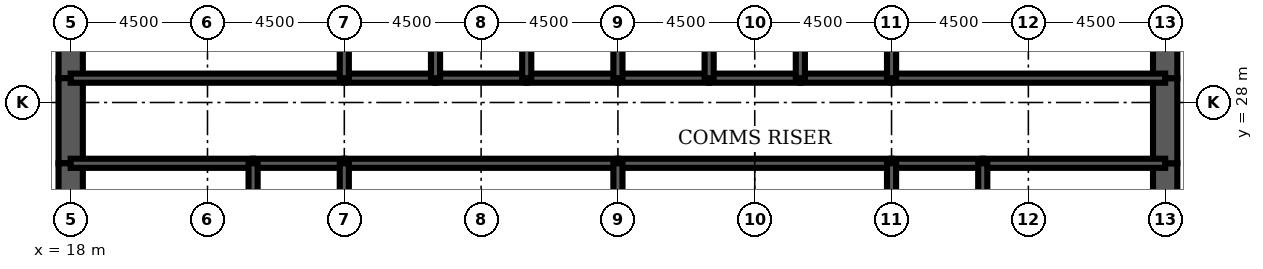
"""IFC4 building model, lengths in metres.
Left out: names, types, materials, properties, quantities, classifications, styles, units other than length and angle.
Written with IfcOpenShell. Run it as: python <this file> out.ifc"""

import sys

from ifc_helpers import new_model, si_unit, direction, frame, frame_2d, origin, place, context, subcontext, project, spatial, rectangle, extrude, element, fill, save


model = new_model("IFC4")
c1 = context("Model", 3, precision=1e-05, world=origin(), true_north=direction((0.0, 1.0)))
c2 = subcontext(c1, "Body", "Model", "MODEL_VIEW")
j1 = project(units=[si_unit("LENGTHUNIT", "METRE"), si_unit("PLANEANGLEUNIT", "RADIAN")], contexts=[c1])
p1 = place(None, origin())
s1 = spatial("IfcSite", under=j1, at=p1, CompositionType="ELEMENT")
p2 = place(p1, origin())
s2 = spatial("IfcBuilding", under=s1, at=p2, CompositionType="ELEMENT")
p3 = place(p2, frame((0.0, 0.0, 253.0)))
s3 = spatial("IfcBuildingStorey", under=s2, at=p3, CompositionType="ELEMENT", Elevation=253.0)
p4 = place(p3, frame((18.0, 32.0, 0.0), z_axis=(0.0, 0.0, 1.0), x_axis=(0.0, -1.0, 0.0)))
e1 = element("IfcWall", 1, at=p4, inside=s3, PredefinedType="SHEAR", context=c2, shape_type="SweptSolid", body=[
    extrude(rectangle(XDim=3.2, YDim=0.8, at=frame_2d((1.6, 0.0))), origin(), (0.0, 0.0, 1.0), 4.2),
])
p5 = place(p3, frame((18.0, 28.8, 0.0), z_axis=(0.0, 0.0, 1.0), x_axis=(0.0, -1.0, 0.0)))
e2 = element("IfcWall", 2, at=p5, inside=s3, PredefinedType="SHEAR", context=c2, shape_type="SweptSolid", body=[
    extrude(rectangle(XDim=2.8, YDim=0.8, at=frame_2d((1.4, 0.0))), origin(), (0.0, 0.0, 1.0), 4.2),
])
p6 = place(p5, frame((0.4, 0.0, 0.0)))
e3 = element("IfcOpeningElement", 3, at=p6, cuts=e2, PredefinedType="OPENING", context=c2, shape_type="SweptSolid", body=[
    extrude(rectangle(XDim=1.8, YDim=2.1, at=frame_2d((0.9, 1.05))), frame((0.0, 0.41, 0.0), z_axis=(0.0, -1.0, 0.0), x_axis=(1.0, 0.0, 0.0)), (0.0, 0.0, 1.0), 0.82),
])
for number, where, z_axis, x_axis in (
    (4, (18.0, 26.0, 0.0), (0.0, 0.0, 1.0), (0.0, -1.0, 0.0)),
    (5, (54.0, 22.0, 0.0), (0.0, 0.0, 1.0), (0.0, 1.0, 0.0)),
):
    element("IfcWall", number, at=place(p3, frame(where, z_axis=z_axis, x_axis=x_axis)), inside=s3, PredefinedType="SHEAR", context=c2, shape_type="SweptSolid", body=[
        extrude(rectangle(XDim=4.0, YDim=0.8, at=frame_2d((2.0, 0.0))), origin(), (0.0, 0.0, 1.0), 4.2),
    ])
p7 = place(p3, frame((54.0, 26.0, 0.0), z_axis=(0.0, 0.0, 1.0), x_axis=(0.0, 1.0, 0.0)))
e6 = element("IfcWall", 6, at=p7, inside=s3, PredefinedType="SHEAR", context=c2, shape_type="SweptSolid", body=[
    extrude(rectangle(XDim=2.8, YDim=0.8, at=frame_2d((1.4, 0.0))), origin(), (0.0, 0.0, 1.0), 4.2),
])
p8 = place(p7, frame((0.6, 0.0, 0.0)))
e7 = element("IfcOpeningElement", 7, at=p8, cuts=e6, PredefinedType="OPENING", context=c2, shape_type="SweptSolid", body=[
    extrude(rectangle(XDim=1.8, YDim=2.1, at=frame_2d((0.9, 1.05))), frame((0.0, 0.41, 0.0), z_axis=(0.0, -1.0, 0.0), x_axis=(1.0, 0.0, 0.0)), (0.0, 0.0, 1.0), 0.82),
])
p9 = place(p3, frame((54.0, 28.8, 0.0), z_axis=(0.0, 0.0, 1.0), x_axis=(0.0, 1.0, 0.0)))
e8 = element("IfcWall", 8, at=p9, inside=s3, PredefinedType="SHEAR", context=c2, shape_type="SweptSolid", body=[
    extrude(rectangle(XDim=3.2, YDim=0.8, at=frame_2d((1.6, 0.0))), origin(), (0.0, 0.0, 1.0), 4.2),
])
p10 = place(p3, frame((18.0, 28.8, 0.0), z_axis=(0.0, 0.0, 1.0), x_axis=(1.0, 0.0, 0.0)))
e9 = element("IfcWall", 9, at=p10, inside=s3, PredefinedType="SOLIDWALL", context=c2, shape_type="SweptSolid", body=[
    extrude(rectangle(XDim=9.0, YDim=0.3, at=frame_2d((4.5, 0.0))), origin(), (0.0, 0.0, 1.0), 4.2),
])
p11 = place(p10, frame((0.65, 0.0, 0.0)))
e10 = element("IfcOpeningElement", 10, at=p11, cuts=e9, PredefinedType="OPENING", context=c2, shape_type="SweptSolid", body=[
    extrude(rectangle(XDim=1.0, YDim=2.1, at=frame_2d((0.5, 1.05))), frame((0.0, 0.16, 0.0), z_axis=(0.0, -1.0, 0.0), x_axis=(1.0, 0.0, 0.0)), (0.0, 0.0, 1.0), 0.32),
])
p12 = place(p3, frame((27.0, 28.8, 0.0), z_axis=(0.0, 0.0, 1.0), x_axis=(1.0, 0.0, 0.0)))
e11 = element("IfcWall", 11, at=p12, inside=s3, PredefinedType="SOLIDWALL", context=c2, shape_type="SweptSolid", body=[
    extrude(rectangle(XDim=3.0, YDim=0.3, at=frame_2d((1.5, 0.0))), origin(), (0.0, 0.0, 1.0), 4.2),
])
p13 = place(p12, frame((0.95, 0.0, 0.0)))
e12 = element("IfcOpeningElement", 12, at=p13, cuts=e11, PredefinedType="OPENING", context=c2, shape_type="SweptSolid", body=[
    extrude(rectangle(XDim=1.1, YDim=2.2, at=frame_2d((0.55, 1.1))), frame((0.0, 0.16, 0.0), z_axis=(0.0, -1.0, 0.0), x_axis=(1.0, 0.0, 0.0)), (0.0, 0.0, 1.0), 0.32),
])
p14 = place(p3, frame((30.0, 28.8, 0.0), z_axis=(0.0, 0.0, 1.0), x_axis=(1.0, 0.0, 0.0)))
e13 = element("IfcWall", 13, at=p14, inside=s3, PredefinedType="SOLIDWALL", context=c2, shape_type="SweptSolid", body=[
    extrude(rectangle(XDim=3.0, YDim=0.3, at=frame_2d((1.5, 0.0))), origin(), (0.0, 0.0, 1.0), 4.2),
])
p15 = place(p14, frame((0.95, 0.0, 0.0)))
e14 = element("IfcOpeningElement", 14, at=p15, cuts=e13, PredefinedType="OPENING", context=c2, shape_type="SweptSolid", body=[
    extrude(rectangle(XDim=1.1, YDim=2.2, at=frame_2d((0.55, 1.1))), frame((0.0, 0.16, 0.0), z_axis=(0.0, -1.0, 0.0), x_axis=(1.0, 0.0, 0.0)), (0.0, 0.0, 1.0), 0.32),
])
p16 = place(p3, frame((33.0, 28.8, 0.0), z_axis=(0.0, 0.0, 1.0), x_axis=(1.0, 0.0, 0.0)))
e15 = element("IfcWall", 15, at=p16, inside=s3, PredefinedType="SOLIDWALL", context=c2, shape_type="SweptSolid", body=[
    extrude(rectangle(XDim=3.0, YDim=0.3, at=frame_2d((1.5, 0.0))), origin(), (0.0, 0.0, 1.0), 4.2),
])
p17 = place(p16, frame((0.95, 0.0, 0.0)))
e16 = element("IfcOpeningElement", 16, at=p17, cuts=e15, PredefinedType="OPENING", context=c2, shape_type="SweptSolid", body=[
    extrude(rectangle(XDim=1.1, YDim=2.2, at=frame_2d((0.55, 1.1))), frame((0.0, 0.16, 0.0), z_axis=(0.0, -1.0, 0.0), x_axis=(1.0, 0.0, 0.0)), (0.0, 0.0, 1.0), 0.32),
])
for number, where, z_axis, x_axis in (
    (17, (36.0, 28.8, 0.0), (0.0, 0.0, 1.0), (1.0, 0.0, 0.0)),
    (18, (39.0, 28.8, 0.0), (0.0, 0.0, 1.0), (1.0, 0.0, 0.0)),
):
    element("IfcWall", number, at=place(p3, frame(where, z_axis=z_axis, x_axis=x_axis)), inside=s3, PredefinedType="SOLIDWALL", context=c2, shape_type="SweptSolid", body=[
        extrude(rectangle(XDim=3.0, YDim=0.3, at=frame_2d((1.5, 0.0))), origin(), (0.0, 0.0, 1.0), 4.2),
    ])
p18 = place(p3, frame((42.0, 28.8, 0.0), z_axis=(0.0, 0.0, 1.0), x_axis=(1.0, 0.0, 0.0)))
e19 = element("IfcWall", 19, at=p18, inside=s3, PredefinedType="SOLIDWALL", context=c2, shape_type="SweptSolid", body=[
    extrude(rectangle(XDim=3.0, YDim=0.3, at=frame_2d((1.5, 0.0))), origin(), (0.0, 0.0, 1.0), 4.2),
])
p19 = place(p18, frame((0.95, 0.0, 0.0)))
e20 = element("IfcOpeningElement", 20, at=p19, cuts=e19, PredefinedType="OPENING", context=c2, shape_type="SweptSolid", body=[
    extrude(rectangle(XDim=1.1, YDim=2.2, at=frame_2d((0.55, 1.1))), frame((0.0, 0.16, 0.0), z_axis=(0.0, -1.0, 0.0), x_axis=(1.0, 0.0, 0.0)), (0.0, 0.0, 1.0), 0.32),
])
p20 = place(p3, frame((45.0, 28.8, 0.0), z_axis=(0.0, 0.0, 1.0), x_axis=(1.0, 0.0, 0.0)))
e21 = element("IfcWall", 21, at=p20, inside=s3, PredefinedType="SOLIDWALL", context=c2, shape_type="SweptSolid", body=[
    extrude(rectangle(XDim=9.0, YDim=0.3, at=frame_2d((4.5, 0.0))), origin(), (0.0, 0.0, 1.0), 4.2),
])
p21 = place(p20, frame((7.35, 0.0, 0.0)))
e22 = element("IfcOpeningElement", 22, at=p21, cuts=e21, PredefinedType="OPENING", context=c2, shape_type="SweptSolid", body=[
    extrude(rectangle(XDim=1.0, YDim=2.1, at=frame_2d((0.5, 1.05))), frame((0.0, 0.16, 0.0), z_axis=(0.0, -1.0, 0.0), x_axis=(1.0, 0.0, 0.0)), (0.0, 0.0, 1.0), 0.32),
])
p22 = place(p3, frame((18.0, 26.0, 0.0), z_axis=(0.0, 0.0, 1.0), x_axis=(1.0, 0.0, 0.0)))
e23 = element("IfcWall", 23, at=p22, inside=s3, PredefinedType="SOLIDWALL", context=c2, shape_type="SweptSolid", body=[
    extrude(rectangle(XDim=6.0, YDim=0.3, at=frame_2d((3.0, 0.0))), origin(), (0.0, 0.0, 1.0), 4.2),
])
p23 = place(p3, frame((24.0, 26.0, 0.0), z_axis=(0.0, 0.0, 1.0), x_axis=(1.0, 0.0, 0.0)))
e24 = element("IfcWall", 24, at=p23, inside=s3, PredefinedType="SOLIDWALL", context=c2, shape_type="SweptSolid", body=[
    extrude(rectangle(XDim=3.0, YDim=0.3, at=frame_2d((1.5, 0.0))), origin(), (0.0, 0.0, 1.0), 4.2),
])
for number, where, z_axis, x_axis in (
    (25, (27.0, 26.0, 0.0), (0.0, 0.0, 1.0), (1.0, 0.0, 0.0)),
    (26, (36.0, 26.0, 0.0), (0.0, 0.0, 1.0), (1.0, 0.0, 0.0)),
):
    element("IfcWall", number, at=place(p3, frame(where, z_axis=z_axis, x_axis=x_axis)), inside=s3, PredefinedType="SOLIDWALL", context=c2, shape_type="SweptSolid", body=[
        extrude(rectangle(XDim=9.0, YDim=0.3, at=frame_2d((4.5, 0.0))), origin(), (0.0, 0.0, 1.0), 4.2),
    ])
p24 = place(p3, frame((45.0, 26.0, 0.0), z_axis=(0.0, 0.0, 1.0), x_axis=(1.0, 0.0, 0.0)))
e27 = element("IfcWall", 27, at=p24, inside=s3, PredefinedType="SOLIDWALL", context=c2, shape_type="SweptSolid", body=[
    extrude(rectangle(XDim=3.0, YDim=0.3, at=frame_2d((1.5, 0.0))), origin(), (0.0, 0.0, 1.0), 4.2),
])
p25 = place(p3, frame((48.0, 26.0, 0.0), z_axis=(0.0, 0.0, 1.0), x_axis=(1.0, 0.0, 0.0)))
e28 = element("IfcWall", 28, at=p25, inside=s3, PredefinedType="SOLIDWALL", context=c2, shape_type="SweptSolid", body=[
    extrude(rectangle(XDim=6.0, YDim=0.3, at=frame_2d((3.0, 0.0))), origin(), (0.0, 0.0, 1.0), 4.2),
])
for number, where, z_axis, x_axis in (
    (29, (27.0, 28.8, 0.0), (0.0, 0.0, 1.0), (0.0, 1.0, 0.0)),
    (30, (30.0, 28.8, 0.0), (0.0, 0.0, 1.0), (0.0, 1.0, 0.0)),
    (31, (33.0, 28.8, 0.0), (0.0, 0.0, 1.0), (0.0, 1.0, 0.0)),
    (32, (36.0, 28.8, 0.0), (0.0, 0.0, 1.0), (0.0, 1.0, 0.0)),
    (33, (39.0, 28.8, 0.0), (0.0, 0.0, 1.0), (0.0, 1.0, 0.0)),
    (34, (42.0, 28.8, 0.0), (0.0, 0.0, 1.0), (0.0, 1.0, 0.0)),
    (35, (45.0, 28.8, 0.0), (0.0, 0.0, 1.0), (0.0, 1.0, 0.0)),
):
    element("IfcWall", number, at=place(p3, frame(where, z_axis=z_axis, x_axis=x_axis)), inside=s3, PredefinedType="SOLIDWALL", context=c2, shape_type="SweptSolid", body=[
        extrude(rectangle(XDim=3.2, YDim=0.3, at=frame_2d((1.6, 0.0))), origin(), (0.0, 0.0, 1.0), 4.2),
    ])
for number, where, z_axis, x_axis in (
    (36, (24.0, 22.0, 0.0), (0.0, 0.0, 1.0), (0.0, 1.0, 0.0)),
    (37, (27.0, 22.0, 0.0), (0.0, 0.0, 1.0), (0.0, 1.0, 0.0)),
    (38, (36.0, 22.0, 0.0), (0.0, 0.0, 1.0), (0.0, 1.0, 0.0)),
    (39, (45.0, 22.0, 0.0), (0.0, 0.0, 1.0), (0.0, 1.0, 0.0)),
    (40, (48.0, 22.0, 0.0), (0.0, 0.0, 1.0), (0.0, 1.0, 0.0)),
):
    element("IfcWall", number, at=place(p3, frame(where, z_axis=z_axis, x_axis=x_axis)), inside=s3, PredefinedType="SOLIDWALL", context=c2, shape_type="SweptSolid", body=[
        extrude(rectangle(XDim=4.0, YDim=0.3, at=frame_2d((2.0, 0.0))), origin(), (0.0, 0.0, 1.0), 4.2),
    ])
p26 = place(p3, frame((42.5, 22.15, 0.0), z_axis=(0.0, 0.0, 1.0), x_axis=(0.0, 1.0, 0.0)))
e41 = element("IfcWall", 41, at=p26, inside=s3, PredefinedType="PARTITIONING", context=c2, shape_type="SweptSolid", body=[
    extrude(rectangle(XDim=3.7, YDim=0.15, at=frame_2d((1.85, 0.0))), origin(), (0.0, 0.0, 1.0), 3.0),
])
p27 = place(p26, frame((2.2, 0.0, 0.0)))
e42 = element("IfcOpeningElement", 42, at=p27, cuts=e41, PredefinedType="OPENING", context=c2, shape_type="SweptSolid", body=[
    extrude(rectangle(XDim=1.0, YDim=2.1, at=frame_2d((0.5, 1.05))), frame((0.0, 0.085, 0.0), z_axis=(0.0, -1.0, 0.0), x_axis=(1.0, 0.0, 0.0)), (0.0, 0.0, 1.0), 0.17),
])
p28 = place(p3, frame((51.725, 22.15, 0.0), z_axis=(0.0, 0.0, 1.0), x_axis=(0.0, 1.0, 0.0)))
e43 = element("IfcWall", 43, at=p28, inside=s3, PredefinedType="PARTITIONING", context=c2, shape_type="SweptSolid", body=[
    extrude(rectangle(XDim=3.7, YDim=0.15, at=frame_2d((1.85, 0.0))), origin(), (0.0, 0.0, 1.0), 3.0),
])
p29 = place(p3, frame((49.2, 26.15, 0.0), z_axis=(0.0, 0.0, 1.0), x_axis=(0.0, 1.0, 0.0)))
e44 = element("IfcWall", 44, at=p29, inside=s3, PredefinedType="PARTITIONING", context=c2, shape_type="SweptSolid", body=[
    extrude(rectangle(XDim=2.5, YDim=0.15, at=frame_2d((1.25, 0.0))), origin(), (0.0, 0.0, 1.0), 3.0),
])
p30 = place(p29, frame((1.15, 0.0, 0.0)))
e45 = element("IfcOpeningElement", 45, at=p30, cuts=e44, PredefinedType="OPENING", context=c2, shape_type="SweptSolid", body=[
    extrude(rectangle(XDim=1.0, YDim=2.1, at=frame_2d((0.5, 1.05))), frame((0.0, 0.085, 0.0), z_axis=(0.0, -1.0, 0.0), x_axis=(1.0, 0.0, 0.0)), (0.0, 0.0, 1.0), 0.17),
])
p31 = place(p27, origin())
e46 = element("IfcDoor", 46, at=p31, inside=s3, OperationType="SINGLE_SWING_RIGHT", PredefinedType="DOOR", context=c2, shape_type="SweptSolid", body=[
    extrude(rectangle(XDim=1.0, YDim=2.1, at=frame_2d((0.5, 1.05))), frame((0.0, 0.025, 0.0), z_axis=(0.0, -1.0, 0.0), x_axis=(1.0, 0.0, 0.0)), (0.0, 0.0, 1.0), 0.05),
])
fill(e42, e46)
p32 = place(p30, origin())
e47 = element("IfcDoor", 47, at=p32, inside=s3, OperationType="SINGLE_SWING_RIGHT", PredefinedType="DOOR", context=c2, shape_type="SweptSolid", body=[
    extrude(rectangle(XDim=1.0, YDim=2.1, at=frame_2d((0.5, 1.05))), frame((0.0, 0.025, 0.0), z_axis=(0.0, -1.0, 0.0), x_axis=(1.0, 0.0, 0.0)), (0.0, 0.0, 1.0), 0.05),
])
fill(e45, e47)
p33 = place(p19, origin())
e48 = element("IfcDoor", 48, at=p33, inside=s3, OperationType="DOUBLE_DOOR_SLIDING", PredefinedType="USERDEFINED", context=c2, shape_type="SweptSolid", body=[
    extrude(rectangle(XDim=1.1, YDim=2.2, at=frame_2d((0.55, 1.1))), frame((0.0, 0.025, 0.0), z_axis=(0.0, -1.0, 0.0), x_axis=(1.0, 0.0, 0.0)), (0.0, 0.0, 1.0), 0.05),
])
fill(e20, e48)
p34 = place(p13, origin())
e49 = element("IfcDoor", 49, at=p34, inside=s3, OperationType="DOUBLE_DOOR_SLIDING", PredefinedType="USERDEFINED", context=c2, shape_type="SweptSolid", body=[
    extrude(rectangle(XDim=1.1, YDim=2.2, at=frame_2d((0.55, 1.1))), frame((0.0, 0.025, 0.0), z_axis=(0.0, -1.0, 0.0), x_axis=(1.0, 0.0, 0.0)), (0.0, 0.0, 1.0), 0.05),
])
fill(e12, e49)
p35 = place(p15, origin())
e50 = element("IfcDoor", 50, at=p35, inside=s3, OperationType="DOUBLE_DOOR_SLIDING", PredefinedType="USERDEFINED", context=c2, shape_type="SweptSolid", body=[
    extrude(rectangle(XDim=1.1, YDim=2.2, at=frame_2d((0.55, 1.1))), frame((0.0, 0.025, 0.0), z_axis=(0.0, -1.0, 0.0), x_axis=(1.0, 0.0, 0.0)), (0.0, 0.0, 1.0), 0.05),
])
fill(e14, e50)
p36 = place(p17, origin())
e51 = element("IfcDoor", 51, at=p36, inside=s3, OperationType="DOUBLE_DOOR_SLIDING", PredefinedType="USERDEFINED", context=c2, shape_type="SweptSolid", body=[
    extrude(rectangle(XDim=1.1, YDim=2.2, at=frame_2d((0.55, 1.1))), frame((0.0, 0.025, 0.0), z_axis=(0.0, -1.0, 0.0), x_axis=(1.0, 0.0, 0.0)), (0.0, 0.0, 1.0), 0.05),
])
fill(e16, e51)
p37 = place(p11, origin())
e52 = element("IfcDoor", 52, at=p37, inside=s3, OperationType="SINGLE_SWING_LEFT", PredefinedType="DOOR", context=c2, shape_type="SweptSolid", body=[
    extrude(rectangle(XDim=1.0, YDim=2.1, at=frame_2d((0.5, 1.05))), frame((0.0, 0.025, 0.0), z_axis=(0.0, -1.0, 0.0), x_axis=(1.0, 0.0, 0.0)), (0.0, 0.0, 1.0), 0.05),
])
fill(e10, e52)
p38 = place(p21, origin())
e53 = element("IfcDoor", 53, at=p38, inside=s3, OperationType="SINGLE_SWING_RIGHT", PredefinedType="DOOR", context=c2, shape_type="SweptSolid", body=[
    extrude(rectangle(XDim=1.0, YDim=2.1, at=frame_2d((0.5, 1.05))), frame((0.0, 0.025, 0.0), z_axis=(0.0, -1.0, 0.0), x_axis=(1.0, 0.0, 0.0)), (0.0, 0.0, 1.0), 0.05),
])
fill(e22, e53)
p39 = place(p6, origin())
e54 = element("IfcDoor", 54, at=p39, inside=s3, OperationType="SINGLE_SWING_LEFT", PredefinedType="DOOR", context=c2, shape_type="SweptSolid", body=[
    extrude(rectangle(XDim=1.8, YDim=2.1, at=frame_2d((0.9, 1.05))), frame((0.0, 0.4, 0.0), z_axis=(0.0, -1.0, 0.0), x_axis=(1.0, 0.0, 0.0)), (0.0, 0.0, 1.0), 0.8),
])
fill(e3, e54)
p40 = place(p8, origin())
e55 = element("IfcDoor", 55, at=p40, inside=s3, OperationType="SINGLE_SWING_LEFT", PredefinedType="DOOR", context=c2, shape_type="SweptSolid", body=[
    extrude(rectangle(XDim=1.8, YDim=2.1, at=frame_2d((0.9, 1.05))), frame((0.0, 0.4, 0.0), z_axis=(0.0, -1.0, 0.0), x_axis=(1.0, 0.0, 0.0)), (0.0, 0.0, 1.0), 0.8),
])
fill(e7, e55)
save(model, sys.argv[1])
